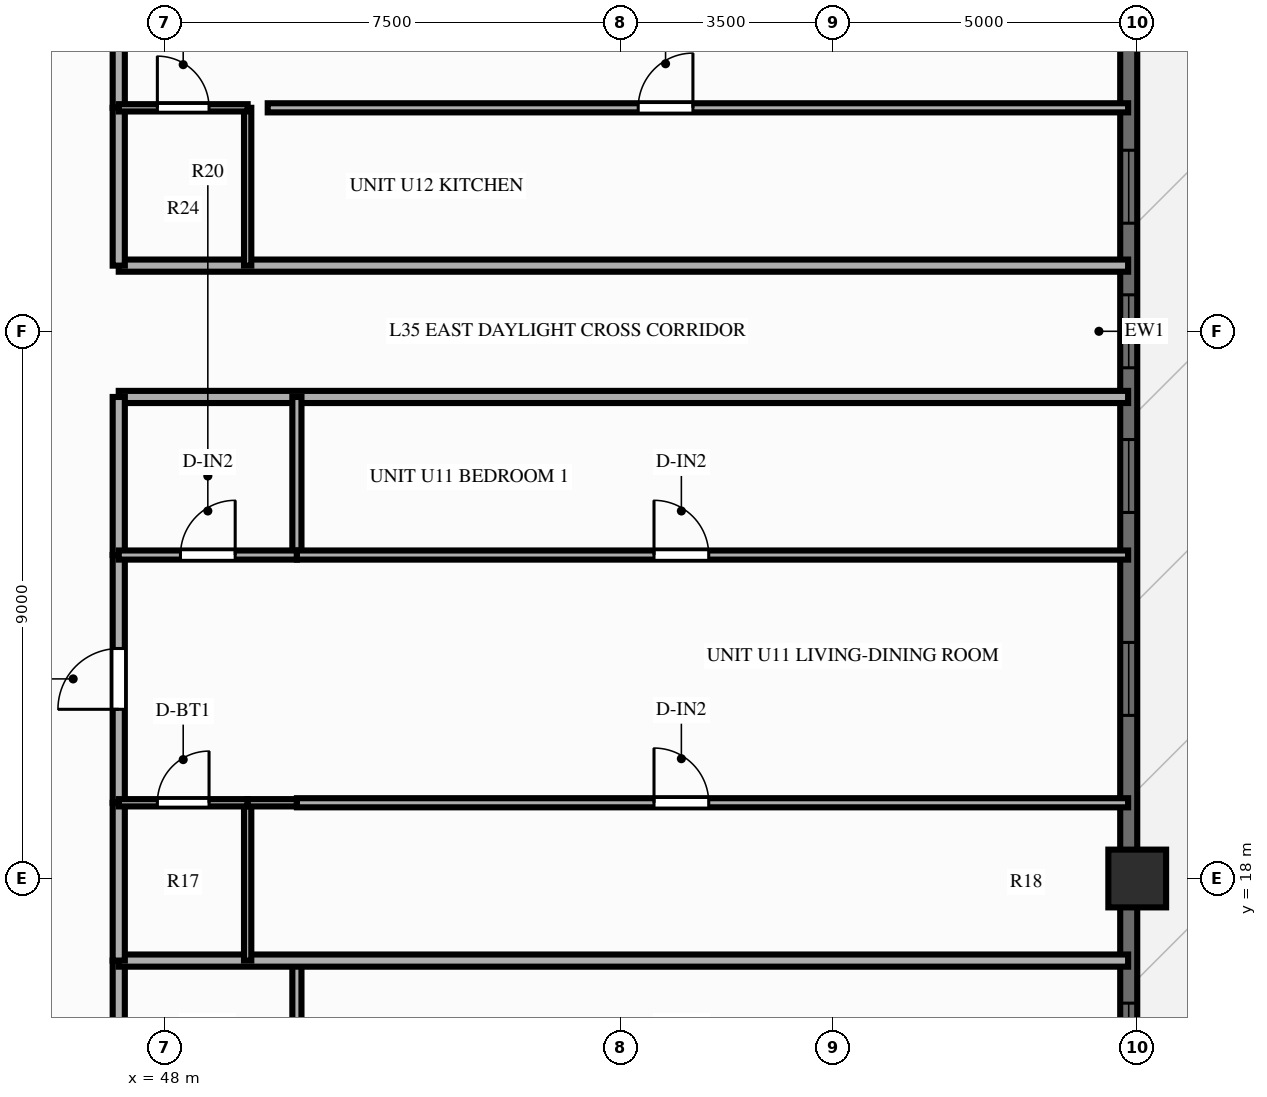
"""IFC4 building model, lengths in metres.
Left out: names, types, materials, properties, quantities, classifications, styles, units other than length and angle.
Written with IfcOpenShell. Run it as: python <this file> out.ifc"""

import sys

from ifc_helpers import new_model, si_unit, direction, frame, frame_2d, origin, origin_2d, place, context, subcontext, project, spatial, rectangle, extrude, source, transform, mapped, element, fill, save


model = new_model("IFC4")
c1 = context("Model", 3, precision=1e-05, world=origin(), true_north=direction((0.0, 1.0)))
c2 = subcontext(c1, "Body", "Model", "MODEL_VIEW")
j1 = project(units=[si_unit("LENGTHUNIT", "METRE"), si_unit("PLANEANGLEUNIT", "RADIAN")], contexts=[c1])
p1 = place(None, origin())
s1 = spatial("IfcSite", under=j1, at=p1, CompositionType="ELEMENT")
p2 = place(p1, origin())
s2 = spatial("IfcBuilding", under=s1, at=p2, CompositionType="ELEMENT")
p3 = place(p2, frame((0.0, 0.0, 110.85)))
s3 = spatial("IfcBuildingStorey", under=s2, at=p3, CompositionType="ELEMENT", Elevation=110.85)
m1 = source(origin(), c2, "Body", "SweptSolid", [
    extrude(rectangle(XDim=0.95, YDim=0.95, at=origin_2d()), origin(), (0.0, 0.0, 1.0), 3.0),
])
p4 = place(p3, frame((64.0, 18.0, 0.0), z_axis=(0.0, 0.0, 1.0), x_axis=(1.0, 0.0, 0.0)))
e1 = element("IfcColumn", 1, at=p4, inside=s3, PredefinedType="COLUMN", context=c2, shape_type="MappedRepresentation", body=[
    mapped(m1, transform((0.0, 0.0, 0.0), scale=1.0)),
])
p5 = place(p3, frame((63.86, 7.2, 0.0), z_axis=(0.0, 0.0, 1.0), x_axis=(0.0, 1.0, 0.0)))
e2 = element("IfcWall", 2, at=p5, inside=s3, PredefinedType="SOLIDWALL", context=c2, shape_type="SweptSolid", body=[
    extrude(rectangle(XDim=39.6, YDim=0.28, at=frame_2d((19.8, 0.0))), origin(), (0.0, 0.0, 1.0), 2.28),
])
p6 = place(p5, frame((0.945, 0.0, 0.25)))
e3 = element("IfcOpeningElement", 3, at=p6, cuts=e2, PredefinedType="OPENING", context=c2, shape_type="SweptSolid", body=[
    extrude(rectangle(XDim=1.2, YDim=1.5, at=frame_2d((0.6, 0.75))), frame((0.0, 0.152, 0.0), z_axis=(0.0, -1.0, 0.0), x_axis=(1.0, 0.0, 0.0)), (0.0, 0.0, 1.0), 0.304),
])
p7 = place(p5, frame((4.213, 0.0, 0.25)))
e4 = element("IfcOpeningElement", 4, at=p7, cuts=e2, PredefinedType="OPENING", context=c2, shape_type="SweptSolid", body=[
    extrude(rectangle(XDim=1.2, YDim=1.5, at=frame_2d((0.6, 0.75))), frame((0.0, 0.152, 0.0), z_axis=(0.0, -1.0, 0.0), x_axis=(1.0, 0.0, 0.0)), (0.0, 0.0, 1.0), 0.304),
])
p8 = place(p5, frame((7.55, 0.0, 0.25)))
e5 = element("IfcOpeningElement", 5, at=p8, cuts=e2, PredefinedType="OPENING", context=c2, shape_type="SweptSolid", body=[
    extrude(rectangle(XDim=1.2, YDim=1.5, at=frame_2d((0.6, 0.75))), frame((0.0, 0.152, 0.0), z_axis=(0.0, -1.0, 0.0), x_axis=(1.0, 0.0, 0.0)), (0.0, 0.0, 1.0), 0.304),
])
p9 = place(p5, frame((13.483, 0.0, 0.25)))
e6 = element("IfcOpeningElement", 6, at=p9, cuts=e2, PredefinedType="OPENING", context=c2, shape_type="SweptSolid", body=[
    extrude(rectangle(XDim=1.2, YDim=1.5, at=frame_2d((0.6, 0.75))), frame((0.0, 0.152, 0.0), z_axis=(0.0, -1.0, 0.0), x_axis=(1.0, 0.0, 0.0)), (0.0, 0.0, 1.0), 0.304),
])
p10 = place(p5, frame((16.82, 0.0, 0.25)))
e7 = element("IfcOpeningElement", 7, at=p10, cuts=e2, PredefinedType="OPENING", context=c2, shape_type="SweptSolid", body=[
    extrude(rectangle(XDim=1.2, YDim=1.5, at=frame_2d((0.6, 0.75))), frame((0.0, 0.152, 0.0), z_axis=(0.0, -1.0, 0.0), x_axis=(1.0, 0.0, 0.0)), (0.0, 0.0, 1.0), 0.304),
])
p11 = place(p5, frame((19.2, 0.0, 0.25)))
e8 = element("IfcOpeningElement", 8, at=p11, cuts=e2, PredefinedType="OPENING", context=c2, shape_type="SweptSolid", body=[
    extrude(rectangle(XDim=1.2, YDim=1.5, at=frame_2d((0.6, 0.75))), frame((0.0, 0.152, 0.0), z_axis=(0.0, -1.0, 0.0), x_axis=(1.0, 0.0, 0.0)), (0.0, 0.0, 1.0), 0.304),
])
p12 = place(p5, frame((21.578, 0.0, 0.25)))
e9 = element("IfcOpeningElement", 9, at=p12, cuts=e2, PredefinedType="OPENING", context=c2, shape_type="SweptSolid", body=[
    extrude(rectangle(XDim=1.2, YDim=1.5, at=frame_2d((0.6, 0.75))), frame((0.0, 0.152, 0.0), z_axis=(0.0, -1.0, 0.0), x_axis=(1.0, 0.0, 0.0)), (0.0, 0.0, 1.0), 0.304),
])
p13 = place(p5, frame((26.313, 0.0, 0.0), z_axis=(0.0, 0.0, 1.0), x_axis=(-1.0, 0.0, 0.0)))
e10 = element("IfcOpeningElement", 10, at=p13, cuts=e2, PredefinedType="OPENING", context=c2, shape_type="SweptSolid", body=[
    extrude(rectangle(XDim=1.6, YDim=2.15, at=frame_2d((0.8, 1.075))), frame((0.0, 0.152, 0.0), z_axis=(0.0, -1.0, 0.0), x_axis=(1.0, 0.0, 0.0)), (0.0, 0.0, 1.0), 0.304),
])
p14 = place(p5, frame((29.305, 0.0, 0.25)))
e11 = element("IfcOpeningElement", 11, at=p14, cuts=e2, PredefinedType="OPENING", context=c2, shape_type="SweptSolid", body=[
    extrude(rectangle(XDim=0.7, YDim=1.5, at=frame_2d((0.35, 0.75))), frame((0.0, 0.152, 0.0), z_axis=(0.0, -1.0, 0.0), x_axis=(1.0, 0.0, 0.0)), (0.0, 0.0, 1.0), 0.304),
])
p15 = place(p5, frame((30.848, 0.0, 0.25)))
e12 = element("IfcOpeningElement", 12, at=p15, cuts=e2, PredefinedType="OPENING", context=c2, shape_type="SweptSolid", body=[
    extrude(rectangle(XDim=1.2, YDim=1.5, at=frame_2d((0.6, 0.75))), frame((0.0, 0.152, 0.0), z_axis=(0.0, -1.0, 0.0), x_axis=(1.0, 0.0, 0.0)), (0.0, 0.0, 1.0), 0.304),
])
p16 = place(p5, frame((34.183, 0.0, 0.25)))
e13 = element("IfcOpeningElement", 13, at=p16, cuts=e2, PredefinedType="OPENING", context=c2, shape_type="SweptSolid", body=[
    extrude(rectangle(XDim=1.2, YDim=1.5, at=frame_2d((0.6, 0.75))), frame((0.0, 0.152, 0.0), z_axis=(0.0, -1.0, 0.0), x_axis=(1.0, 0.0, 0.0)), (0.0, 0.0, 1.0), 0.304),
])
p17 = place(p5, frame((37.452, 0.0, 0.25)))
e14 = element("IfcOpeningElement", 14, at=p17, cuts=e2, PredefinedType="OPENING", context=c2, shape_type="SweptSolid", body=[
    extrude(rectangle(XDim=1.2, YDim=1.5, at=frame_2d((0.6, 0.75))), frame((0.0, 0.152, 0.0), z_axis=(0.0, -1.0, 0.0), x_axis=(1.0, 0.0, 0.0)), (0.0, 0.0, 1.0), 0.304),
])
p18 = place(p3, frame((47.25, 25.92, 0.0), z_axis=(0.0, 0.0, 1.0), x_axis=(1.0, 0.0, 0.0)))
e15 = element("IfcWall", 15, at=p18, inside=s3, PredefinedType="PARTITIONING", context=c2, shape_type="SweptSolid", body=[
    extrude(rectangle(XDim=16.6, YDim=0.2, at=frame_2d((8.3, 0.0))), origin(), (0.0, 0.0, 1.0), 2.79),
])
p19 = place(p3, frame((47.25, 14.05, 0.0), z_axis=(0.0, 0.0, 1.0), x_axis=(0.0, 1.0, 0.0)))
e16 = element("IfcWall", 16, at=p19, inside=s3, PredefinedType="PARTITIONING", context=c2, shape_type="SweptSolid", body=[
    extrude(rectangle(XDim=2.6, YDim=0.2, at=frame_2d((1.3, 0.0))), origin(), (0.0, 0.0, 1.0), 2.79),
])
p20 = place(p3, frame((50.18, 14.05, 0.0), z_axis=(0.0, 0.0, 1.0), x_axis=(0.0, 1.0, 0.0)))
e17 = element("IfcWall", 17, at=p20, inside=s3, PredefinedType="PARTITIONING", context=c2, shape_type="SweptSolid", body=[
    extrude(rectangle(XDim=2.6, YDim=0.15, at=frame_2d((1.3, 0.0))), origin(), (0.0, 0.0, 1.0), 2.79),
])
p21 = place(p3, frame((47.25, 16.65, 0.0), z_axis=(0.0, 0.0, 1.0), x_axis=(1.0, 0.0, 0.0)))
e18 = element("IfcWall", 18, at=p21, inside=s3, PredefinedType="PARTITIONING", context=c2, shape_type="SweptSolid", body=[
    extrude(rectangle(XDim=16.6, YDim=0.2, at=frame_2d((8.3, 0.0))), origin(), (0.0, 0.0, 1.0), 2.79),
])
p22 = place(p3, frame((47.25, 16.65, 0.0), z_axis=(0.0, 0.0, 1.0), x_axis=(0.0, 1.0, 0.0)))
e19 = element("IfcWall", 19, at=p22, inside=s3, PredefinedType="PARTITIONING", context=c2, shape_type="SweptSolid", body=[
    extrude(rectangle(XDim=2.596, YDim=0.2, at=frame_2d((1.298, 0.0))), origin(), (0.0, 0.0, 1.0), 2.79),
])
p23 = place(p3, frame((47.25, 19.246, 0.0), z_axis=(0.0, 0.0, 1.0), x_axis=(0.0, 1.0, 0.0)))
e20 = element("IfcWall", 20, at=p23, inside=s3, PredefinedType="PARTITIONING", context=c2, shape_type="SweptSolid", body=[
    extrude(rectangle(XDim=4.074, YDim=0.2, at=frame_2d((2.037, 0.0))), origin(), (0.0, 0.0, 1.0), 2.79),
])
p24 = place(p23, frame((1.537, 0.0, 0.0)))
e21 = element("IfcOpeningElement", 21, at=p24, cuts=e20, PredefinedType="OPENING", context=c2, shape_type="SweptSolid", body=[
    extrude(rectangle(XDim=1.0, YDim=2.15, at=frame_2d((0.5, 1.075))), frame((0.0, 0.112, 0.0), z_axis=(0.0, -1.0, 0.0), x_axis=(1.0, 0.0, 0.0)), (0.0, 0.0, 1.0), 0.224),
])
p25 = place(p3, frame((47.25, 23.32, 0.0), z_axis=(0.0, 0.0, 1.0), x_axis=(0.0, 1.0, 0.0)))
e22 = element("IfcWall", 22, at=p25, inside=s3, PredefinedType="PARTITIONING", context=c2, shape_type="SweptSolid", body=[
    extrude(rectangle(XDim=2.6, YDim=0.2, at=frame_2d((1.3, 0.0))), origin(), (0.0, 0.0, 1.0), 2.79),
])
p26 = place(p3, frame((49.37, 16.65, 0.0), z_axis=(0.0, 0.0, 1.0), x_axis=(0.0, 1.0, 0.0)))
e23 = element("IfcWall", 23, at=p26, inside=s3, PredefinedType="PARTITIONING", context=c2, shape_type="SweptSolid", body=[
    extrude(rectangle(XDim=2.596, YDim=0.12, at=frame_2d((1.298, 0.0))), origin(), (0.0, 0.0, 1.0), 2.79),
])
p27 = place(p3, frame((50.18, 23.32, 0.0), z_axis=(0.0, 0.0, 1.0), x_axis=(0.0, 1.0, 0.0)))
e24 = element("IfcWall", 24, at=p27, inside=s3, PredefinedType="PARTITIONING", context=c2, shape_type="SweptSolid", body=[
    extrude(rectangle(XDim=2.6, YDim=0.15, at=frame_2d((1.3, 0.0))), origin(), (0.0, 0.0, 1.0), 2.79),
])
p28 = place(p3, frame((47.25, 19.246, 0.0), z_axis=(0.0, 0.0, 1.0), x_axis=(1.0, 0.0, 0.0)))
e25 = element("IfcWall", 25, at=p28, inside=s3, PredefinedType="PARTITIONING", context=c2, shape_type="SweptSolid", body=[
    extrude(rectangle(XDim=2.12, YDim=0.12, at=frame_2d((1.06, 0.0))), origin(), (0.0, 0.0, 1.0), 2.79),
])
p29 = place(p28, frame((0.635, 0.0, 0.0)))
e26 = element("IfcOpeningElement", 26, at=p29, cuts=e25, PredefinedType="OPENING", context=c2, shape_type="SweptSolid", body=[
    extrude(rectangle(XDim=0.85, YDim=2.05, at=frame_2d((0.425, 1.025))), frame((0.0, 0.072, 0.0), z_axis=(0.0, -1.0, 0.0), x_axis=(1.0, 0.0, 0.0)), (0.0, 0.0, 1.0), 0.144),
])
p30 = place(p3, frame((49.37, 19.246, 0.0), z_axis=(0.0, 0.0, 1.0), x_axis=(1.0, 0.0, 0.0)))
e27 = element("IfcWall", 27, at=p30, inside=s3, PredefinedType="PARTITIONING", context=c2, shape_type="SweptSolid", body=[
    extrude(rectangle(XDim=0.81, YDim=0.12, at=frame_2d((0.405, 0.0))), origin(), (0.0, 0.0, 1.0), 2.79),
])
p31 = place(p3, frame((50.18, 19.246, 0.0), z_axis=(0.0, 0.0, 1.0), x_axis=(1.0, 0.0, 0.0)))
e28 = element("IfcWall", 28, at=p31, inside=s3, PredefinedType="PARTITIONING", context=c2, shape_type="SweptSolid", body=[
    extrude(rectangle(XDim=13.67, YDim=0.15, at=frame_2d((6.835, 0.0))), origin(), (0.0, 0.0, 1.0), 2.79),
])
p32 = place(p31, frame((5.873, 0.0, 0.0)))
e29 = element("IfcOpeningElement", 29, at=p32, cuts=e28, PredefinedType="OPENING", context=c2, shape_type="SweptSolid", body=[
    extrude(rectangle(XDim=0.9, YDim=2.1, at=frame_2d((0.45, 1.05))), frame((0.0, 0.087, 0.0), z_axis=(0.0, -1.0, 0.0), x_axis=(1.0, 0.0, 0.0)), (0.0, 0.0, 1.0), 0.174),
])
p33 = place(p3, frame((47.25, 23.32, 0.0), z_axis=(0.0, 0.0, 1.0), x_axis=(1.0, 0.0, 0.0)))
e30 = element("IfcWall", 30, at=p33, inside=s3, PredefinedType="PARTITIONING", context=c2, shape_type="SweptSolid", body=[
    extrude(rectangle(XDim=2.93, YDim=0.15, at=frame_2d((1.465, 0.0))), origin(), (0.0, 0.0, 1.0), 2.79),
])
p34 = place(p33, frame((1.015, 0.0, 0.0)))
e31 = element("IfcOpeningElement", 31, at=p34, cuts=e30, PredefinedType="OPENING", context=c2, shape_type="SweptSolid", body=[
    extrude(rectangle(XDim=0.9, YDim=2.1, at=frame_2d((0.45, 1.05))), frame((0.0, 0.087, 0.0), z_axis=(0.0, -1.0, 0.0), x_axis=(1.0, 0.0, 0.0)), (0.0, 0.0, 1.0), 0.174),
])
p35 = place(p3, frame((50.18, 23.32, 0.0), z_axis=(0.0, 0.0, 1.0), x_axis=(1.0, 0.0, 0.0)))
e32 = element("IfcWall", 32, at=p35, inside=s3, PredefinedType="PARTITIONING", context=c2, shape_type="SweptSolid", body=[
    extrude(rectangle(XDim=13.67, YDim=0.15, at=frame_2d((6.835, 0.0))), origin(), (0.0, 0.0, 1.0), 2.79),
])
p36 = place(p35, frame((5.873, 0.0, 0.0)))
e33 = element("IfcOpeningElement", 33, at=p36, cuts=e32, PredefinedType="OPENING", context=c2, shape_type="SweptSolid", body=[
    extrude(rectangle(XDim=0.9, YDim=2.1, at=frame_2d((0.45, 1.05))), frame((0.0, 0.087, 0.0), z_axis=(0.0, -1.0, 0.0), x_axis=(1.0, 0.0, 0.0)), (0.0, 0.0, 1.0), 0.174),
])
p37 = place(p3, frame((47.25, 28.08, 0.0), z_axis=(0.0, 0.0, 1.0), x_axis=(1.0, 0.0, 0.0)))
e34 = element("IfcWall", 34, at=p37, inside=s3, PredefinedType="PARTITIONING", context=c2, shape_type="SweptSolid", body=[
    extrude(rectangle(XDim=16.6, YDim=0.2, at=frame_2d((8.3, 0.0))), origin(), (0.0, 0.0, 1.0), 2.79),
])
p38 = place(p3, frame((47.25, 28.08, 0.0), z_axis=(0.0, 0.0, 1.0), x_axis=(0.0, 1.0, 0.0)))
e35 = element("IfcWall", 35, at=p38, inside=s3, PredefinedType="PARTITIONING", context=c2, shape_type="SweptSolid", body=[
    extrude(rectangle(XDim=2.595, YDim=0.2, at=frame_2d((1.298, 0.0))), origin(), (0.0, 0.0, 1.0), 2.79),
])
p39 = place(p3, frame((47.25, 30.676, 0.0), z_axis=(0.0, 0.0, 1.0), x_axis=(0.0, 1.0, 0.0)))
e36 = element("IfcWall", 36, at=p39, inside=s3, PredefinedType="PARTITIONING", context=c2, shape_type="SweptSolid", body=[
    extrude(rectangle(XDim=4.074, YDim=0.2, at=frame_2d((2.037, 0.0))), origin(), (0.0, 0.0, 1.0), 2.79),
])
p40 = place(p39, frame((1.537, 0.0, 0.0)))
e37 = element("IfcOpeningElement", 37, at=p40, cuts=e36, PredefinedType="OPENING", context=c2, shape_type="SweptSolid", body=[
    extrude(rectangle(XDim=1.0, YDim=2.15, at=frame_2d((0.5, 1.075))), frame((0.0, 0.112, 0.0), z_axis=(0.0, -1.0, 0.0), x_axis=(1.0, 0.0, 0.0)), (0.0, 0.0, 1.0), 0.224),
])
p41 = place(p3, frame((49.37, 28.08, 0.0), z_axis=(0.0, 0.0, 1.0), x_axis=(0.0, 1.0, 0.0)))
e38 = element("IfcWall", 38, at=p41, inside=s3, PredefinedType="PARTITIONING", context=c2, shape_type="SweptSolid", body=[
    extrude(rectangle(XDim=2.595, YDim=0.12, at=frame_2d((1.298, 0.0))), origin(), (0.0, 0.0, 1.0), 2.79),
])
p42 = place(p3, frame((47.25, 30.676, 0.0), z_axis=(0.0, 0.0, 1.0), x_axis=(1.0, 0.0, 0.0)))
e39 = element("IfcWall", 39, at=p42, inside=s3, PredefinedType="PARTITIONING", context=c2, shape_type="SweptSolid", body=[
    extrude(rectangle(XDim=2.12, YDim=0.12, at=frame_2d((1.06, 0.0))), origin(), (0.0, 0.0, 1.0), 2.79),
])
p43 = place(p42, frame((0.635, 0.0, 0.0)))
e40 = element("IfcOpeningElement", 40, at=p43, cuts=e39, PredefinedType="OPENING", context=c2, shape_type="SweptSolid", body=[
    extrude(rectangle(XDim=0.85, YDim=2.05, at=frame_2d((0.425, 1.025))), frame((0.0, 0.072, 0.0), z_axis=(0.0, -1.0, 0.0), x_axis=(1.0, 0.0, 0.0)), (0.0, 0.0, 1.0), 0.144),
])
p44 = place(p3, frame((49.7, 30.676, 0.0), z_axis=(0.0, 0.0, 1.0), x_axis=(1.0, 0.0, 0.0)))
e41 = element("IfcWall", 41, at=p44, inside=s3, PredefinedType="PARTITIONING", context=c2, shape_type="SweptSolid", body=[
    extrude(rectangle(XDim=14.15, YDim=0.15, at=frame_2d((7.075, 0.0))), origin(), (0.0, 0.0, 1.0), 2.79),
])
p45 = place(p44, frame((6.093, 0.0, 0.0)))
e42 = element("IfcOpeningElement", 42, at=p45, cuts=e41, PredefinedType="OPENING", context=c2, shape_type="SweptSolid", body=[
    extrude(rectangle(XDim=0.9, YDim=2.1, at=frame_2d((0.45, 1.05))), frame((0.0, 0.087, 0.0), z_axis=(0.0, -1.0, 0.0), x_axis=(1.0, 0.0, 0.0)), (0.0, 0.0, 1.0), 0.174),
])
m2 = source(origin(), c2, "Body", "SweptSolid", [
    extrude(rectangle(XDim=1.2, YDim=1.5, at=frame_2d((0.6, 0.75))), frame((0.0, 0.03, 0.0), z_axis=(0.0, -1.0, 0.0), x_axis=(1.0, 0.0, 0.0)), (0.0, 0.0, 1.0), 0.06),
])
p46 = place(p8, origin())
e43 = element("IfcWindow", 43, at=p46, inside=s3, PartitioningType="SINGLE_PANEL", PredefinedType="WINDOW", context=c2, shape_type="MappedRepresentation", body=[
    mapped(m2, transform((0.0, 0.0, 0.0), scale=1.0)),
])
fill(e5, e43)
p47 = place(p9, origin())
e44 = element("IfcWindow", 44, at=p47, inside=s3, PartitioningType="SINGLE_PANEL", PredefinedType="WINDOW", context=c2, shape_type="MappedRepresentation", body=[
    mapped(m2, transform((0.0, 0.0, 0.0), scale=1.0)),
])
fill(e6, e44)
p48 = place(p10, origin())
e45 = element("IfcWindow", 45, at=p48, inside=s3, PartitioningType="SINGLE_PANEL", PredefinedType="WINDOW", context=c2, shape_type="MappedRepresentation", body=[
    mapped(m2, transform((0.0, 0.0, 0.0), scale=1.0)),
])
fill(e7, e45)
p49 = place(p11, origin())
e46 = element("IfcWindow", 46, at=p49, inside=s3, PartitioningType="SINGLE_PANEL", PredefinedType="WINDOW", context=c2, shape_type="MappedRepresentation", body=[
    mapped(m2, transform((0.0, 0.0, 0.0), scale=1.0)),
])
fill(e8, e46)
p50 = place(p12, origin())
e47 = element("IfcWindow", 47, at=p50, inside=s3, PartitioningType="SINGLE_PANEL", PredefinedType="WINDOW", context=c2, shape_type="MappedRepresentation", body=[
    mapped(m2, transform((0.0, 0.0, 0.0), scale=1.0)),
])
fill(e9, e47)
m3 = source(origin(), c2, "Body", "SweptSolid", [
    extrude(rectangle(XDim=1.0, YDim=2.15, at=frame_2d((0.5, 1.075))), frame((0.0, 0.025, 0.0), z_axis=(0.0, -1.0, 0.0), x_axis=(1.0, 0.0, 0.0)), (0.0, 0.0, 1.0), 0.05),
])
p51 = place(p24, origin())
e48 = element("IfcDoor", 48, at=p51, inside=s3, OperationType="SINGLE_SWING_LEFT", PredefinedType="DOOR", context=c2, shape_type="MappedRepresentation", body=[
    mapped(m3, transform((0.0, 0.0, 0.0), scale=1.0)),
])
fill(e21, e48)
m4 = source(origin(), c2, "Body", "SweptSolid", [
    extrude(rectangle(XDim=0.85, YDim=2.05, at=frame_2d((0.425, 1.025))), frame((0.0, 0.025, 0.0), z_axis=(0.0, -1.0, 0.0), x_axis=(1.0, 0.0, 0.0)), (0.0, 0.0, 1.0), 0.05),
])
p52 = place(p29, origin())
e49 = element("IfcDoor", 49, at=p52, inside=s3, OperationType="SINGLE_SWING_RIGHT", PredefinedType="DOOR", context=c2, shape_type="MappedRepresentation", body=[
    mapped(m4, transform((0.0, 0.0, 0.0), scale=1.0)),
])
fill(e26, e49)
m5 = source(origin(), c2, "Body", "SweptSolid", [
    extrude(rectangle(XDim=0.9, YDim=2.1, at=frame_2d((0.45, 1.05))), frame((0.0, 0.025, 0.0), z_axis=(0.0, -1.0, 0.0), x_axis=(1.0, 0.0, 0.0)), (0.0, 0.0, 1.0), 0.05),
])
p53 = place(p32, origin())
e50 = element("IfcDoor", 50, at=p53, inside=s3, OperationType="SINGLE_SWING_LEFT", PredefinedType="DOOR", context=c2, shape_type="MappedRepresentation", body=[
    mapped(m5, transform((0.0, 0.0, 0.0), scale=1.0)),
])
fill(e29, e50)
p54 = place(p34, origin())
e51 = element("IfcDoor", 51, at=p54, inside=s3, OperationType="SINGLE_SWING_RIGHT", PredefinedType="DOOR", context=c2, shape_type="MappedRepresentation", body=[
    mapped(m5, transform((0.0, 0.0, 0.0), scale=1.0)),
])
fill(e31, e51)
p55 = place(p36, origin())
e52 = element("IfcDoor", 52, at=p55, inside=s3, OperationType="SINGLE_SWING_LEFT", PredefinedType="DOOR", context=c2, shape_type="MappedRepresentation", body=[
    mapped(m5, transform((0.0, 0.0, 0.0), scale=1.0)),
])
fill(e33, e52)
p56 = place(p43, origin())
e53 = element("IfcDoor", 53, at=p56, inside=s3, OperationType="SINGLE_SWING_LEFT", PredefinedType="DOOR", context=c2, shape_type="MappedRepresentation", body=[
    mapped(m4, transform((0.0, 0.0, 0.0), scale=1.0)),
])
fill(e40, e53)
p57 = place(p45, origin())
e54 = element("IfcDoor", 54, at=p57, inside=s3, OperationType="SINGLE_SWING_RIGHT", PredefinedType="DOOR", context=c2, shape_type="MappedRepresentation", body=[
    mapped(m5, transform((0.0, 0.0, 0.0), scale=1.0)),
])
fill(e42, e54)
save(model, sys.argv[1])
